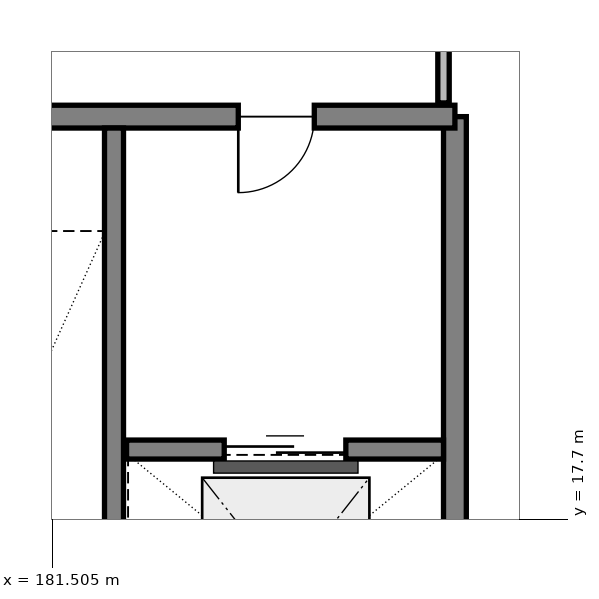
"""IFC4 building model, lengths in metres.
Left out: names, types, materials, properties, quantities, classifications, styles, units other than length and angle.
Written with IfcOpenShell. Run it as: python <this file> out.ifc"""

import sys

from ifc_helpers import new_model, si_unit, direction, frame, frame_2d, origin, place, context, subcontext, project, spatial, rectangle, extrude, element, fill, save


model = new_model("IFC4")
c1 = context("Model", 3, precision=1e-05, world=origin(), true_north=direction((0.0, 1.0)))
c2 = subcontext(c1, "Body", "Model", "MODEL_VIEW")
j1 = project(units=[si_unit("LENGTHUNIT", "METRE"), si_unit("PLANEANGLEUNIT", "RADIAN")], contexts=[c1])
p1 = place(None, origin())
s1 = spatial("IfcSite", under=j1, at=p1, CompositionType="ELEMENT")
p2 = place(p1, origin())
s2 = spatial("IfcBuilding", under=s1, at=p2, CompositionType="ELEMENT")
p3 = place(p2, origin())
s3 = spatial("IfcBuildingStorey", under=s2, at=p3, CompositionType="ELEMENT", Elevation=0.0)
p4 = place(p3, frame((186.8, 15.0, 0.0), z_axis=(0.0, 0.0, 1.0), x_axis=(0.0, 1.0, 0.0)))
e1 = element("IfcWall", 1, at=p4, inside=s3, PredefinedType="SHEAR", context=c2, shape_type="SweptSolid", body=[
    extrude(rectangle(XDim=8.0, YDim=0.3, at=frame_2d((4.0, 0.0), x_axis=(1.0, 0.0))), origin(), (0.0, 0.0, 1.0), 4.24),
])
p5 = place(p3, frame((186.8, 23.0, 0.0), z_axis=(0.0, 0.0, 1.0), x_axis=(-1.0, 0.0, 0.0)))
e2 = element("IfcWall", 2, at=p5, inside=s3, PredefinedType="SHEAR", context=c2, shape_type="SweptSolid", body=[
    extrude(rectangle(XDim=7.6, YDim=0.3, at=frame_2d((3.8, 0.0), x_axis=(1.0, 0.0))), origin(), (0.0, 0.0, 1.0), 4.24),
])
p6 = place(p5, frame((1.85, 0.0, 0.0)))
e3 = element("IfcOpeningElement", 3, at=p6, cuts=e2, PredefinedType="OPENING", context=c2, shape_type="SweptSolid", body=[
    extrude(rectangle(XDim=1.0, YDim=2.15, at=frame_2d((0.5, 1.075), x_axis=(1.0, 0.0))), frame((0.0, 0.16, 0.0), z_axis=(0.0, -1.0, 0.0), x_axis=(1.0, 0.0, 0.0)), (0.0, 0.0, 1.0), 0.32),
])
p7 = place(p5, frame((5.5, 0.0, 0.0)))
e4 = element("IfcOpeningElement", 4, at=p7, cuts=e2, PredefinedType="OPENING", context=c2, shape_type="SweptSolid", body=[
    extrude(rectangle(XDim=1.0, YDim=2.15, at=frame_2d((0.5, 1.075), x_axis=(1.0, 0.0))), frame((0.0, 0.16, 0.0), z_axis=(0.0, -1.0, 0.0), x_axis=(1.0, 0.0, 0.0)), (0.0, 0.0, 1.0), 0.32),
])
p8 = place(p3, frame((182.315, 15.15, 0.0), z_axis=(0.0, 0.0, 1.0), x_axis=(0.0, 1.0, 0.0)))
e5 = element("IfcWall", 5, at=p8, inside=s3, PredefinedType="SHEAR", context=c2, shape_type="SweptSolid", body=[
    extrude(rectangle(XDim=7.7, YDim=0.25, at=frame_2d((3.85, 0.0), x_axis=(1.0, 0.0))), origin(), (0.0, 0.0, 1.0), 4.24),
])
p9 = place(p3, frame((182.48, 18.62, 0.0), z_axis=(0.0, 0.0, 1.0), x_axis=(1.0, 0.0, 0.0)))
e6 = element("IfcWall", 6, at=p9, inside=s3, PredefinedType="SHEAR", context=c2, shape_type="SweptSolid", body=[
    extrude(rectangle(XDim=4.17, YDim=0.25, at=frame_2d((2.085, 0.0), x_axis=(1.0, 0.0))), origin(), (0.0, 0.0, 1.0), 4.24),
])
p10 = place(p9, frame((1.285, 0.0, 0.0)))
e7 = element("IfcOpeningElement", 7, at=p10, cuts=e6, PredefinedType="OPENING", context=c2, shape_type="SweptSolid", body=[
    extrude(rectangle(XDim=1.6, YDim=2.3, at=frame_2d((0.8, 1.15), x_axis=(1.0, 0.0))), frame((0.0, 0.135, 0.0), z_axis=(0.0, -1.0, 0.0), x_axis=(1.0, 0.0, 0.0)), (0.0, 0.0, 1.0), 0.27),
])
p11 = place(p3, frame((186.65, 23.18, 0.0), z_axis=(0.0, 0.0, 1.0), x_axis=(0.0, 1.0, 0.0)))
e8 = element("IfcWall", 8, at=p11, inside=s3, PredefinedType="PARTITIONING", context=c2, shape_type="SweptSolid", body=[
    extrude(rectangle(XDim=4.92, YDim=0.15, at=frame_2d((2.46, 0.0), x_axis=(1.0, 0.0))), origin(), (0.0, 0.0, 1.0), 4.08),
])
p12 = place(p11, frame((1.96, 0.0, 0.0)))
e9 = element("IfcOpeningElement", 9, at=p12, cuts=e8, PredefinedType="OPENING", context=c2, shape_type="SweptSolid", body=[
    extrude(rectangle(XDim=1.0, YDim=2.15, at=frame_2d((0.5, 1.075), x_axis=(1.0, 0.0))), frame((0.0, 0.085, 0.0), z_axis=(0.0, -1.0, 0.0), x_axis=(1.0, 0.0, 0.0)), (0.0, 0.0, 1.0), 0.17),
])
p13 = place(p6, origin())
e10 = element("IfcDoor", 10, at=p13, inside=s3, OperationType="SINGLE_SWING_RIGHT", PredefinedType="DOOR", context=c2, shape_type="SweptSolid", body=[
    extrude(rectangle(XDim=1.0, YDim=2.15, at=frame_2d((0.5, 1.075), x_axis=(1.0, 0.0))), frame((0.0, 0.025, 0.0), z_axis=(0.0, -1.0, 0.0), x_axis=(1.0, 0.0, 0.0)), (0.0, 0.0, 1.0), 0.05),
])
fill(e3, e10)
p14 = place(p10, origin())
e11 = element("IfcDoor", 11, at=p14, inside=s3, OperationType="SLIDING_TO_RIGHT", PredefinedType="DOOR", context=c2, shape_type="SweptSolid", body=[
    extrude(rectangle(XDim=1.6, YDim=2.3, at=frame_2d((0.8, 1.15), x_axis=(1.0, 0.0))), frame((0.0, 0.025, 0.0), z_axis=(0.0, -1.0, 0.0), x_axis=(1.0, 0.0, 0.0)), (0.0, 0.0, 1.0), 0.05),
])
fill(e7, e11)
save(model, sys.argv[1])
